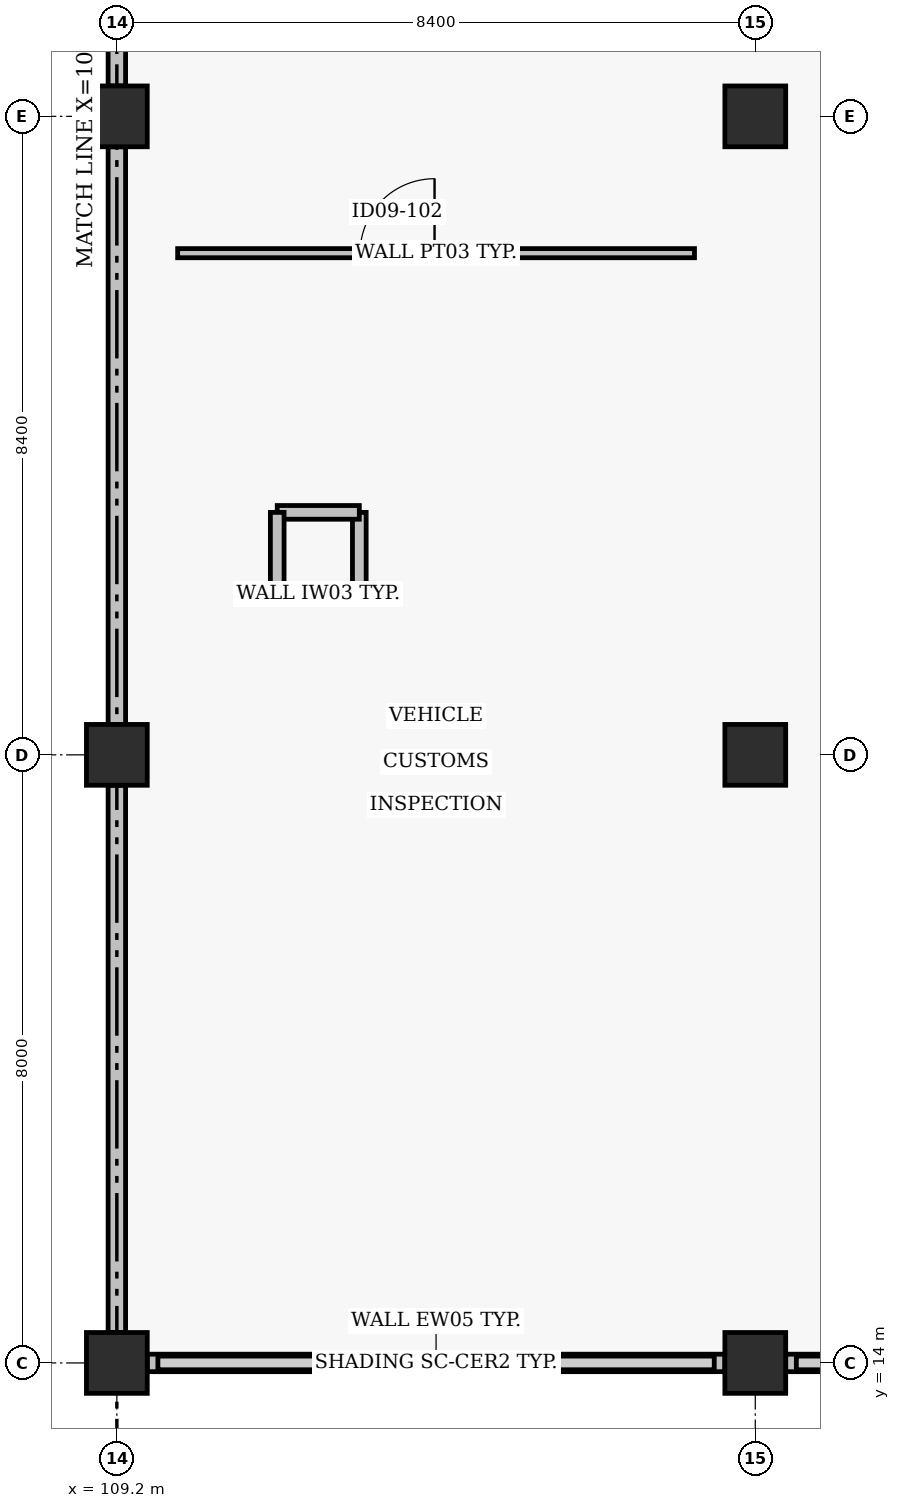
"""IFC4 building model, lengths in metres.
Left out: names, types, materials, properties, quantities, classifications, styles, units other than length and angle.
Written with IfcOpenShell. Run it as: python <this file> out.ifc"""

import sys

from ifc_helpers import new_model, si_unit, direction, frame, frame_2d, origin, origin_2d, place, context, subcontext, project, spatial, rectangle, extrude, element, fill, save


model = new_model("IFC4")
c1 = context("Model", 3, precision=1e-05, world=origin(), true_north=direction((0.0, 1.0)))
c2 = subcontext(c1, "Body", "Model", "MODEL_VIEW")
j1 = project(units=[si_unit("LENGTHUNIT", "METRE"), si_unit("PLANEANGLEUNIT", "RADIAN")], contexts=[c1])
p1 = place(None, origin())
s1 = spatial("IfcSite", under=j1, at=p1, CompositionType="ELEMENT")
p2 = place(p1, origin())
s2 = spatial("IfcBuilding", under=s1, at=p2, CompositionType="ELEMENT")
p3 = place(p2, frame((0.0, 0.0, 5.44)))
s3 = spatial("IfcBuildingStorey", under=s2, at=p3, CompositionType="ELEMENT", Elevation=5.44)
for number, where, z_axis, x_axis in (
    (1, (109.2, 14.0, 0.0), (0.0, 0.0, 1.0), (1.0, 0.0, 0.0)),
    (2, (109.2, 22.0, 0.0), (0.0, 0.0, 1.0), (1.0, 0.0, 0.0)),
    (3, (109.2, 30.4, 0.0), (0.0, 0.0, 1.0), (1.0, 0.0, 0.0)),
    (4, (117.6, 14.0, 0.0), (0.0, 0.0, 1.0), (1.0, 0.0, 0.0)),
    (5, (117.6, 22.0, 0.0), (0.0, 0.0, 1.0), (1.0, 0.0, 0.0)),
    (6, (117.6, 30.4, 0.0), (0.0, 0.0, 1.0), (1.0, 0.0, 0.0)),
):
    element("IfcColumn", number, at=place(p3, frame(where, z_axis=z_axis, x_axis=x_axis)), inside=s3, PredefinedType="COLUMN", context=c2, shape_type="SweptSolid", body=[
        extrude(rectangle(XDim=0.8, YDim=0.8, at=origin_2d()), origin(), (0.0, 0.0, 1.0), 4.16),
    ])
p4 = place(p3, frame((109.6, 14.0, 0.0), z_axis=(0.0, 0.0, 1.0), x_axis=(1.0, 0.0, 0.0)))
e7 = element("IfcWall", 7, at=p4, inside=s3, PredefinedType="PARAPET", context=c2, shape_type="SweptSolid", body=[
    extrude(rectangle(XDim=7.6, YDim=0.23, at=frame_2d((3.8, 0.0))), origin(), (0.0, 0.0, 1.0), 1.15),
])
p5 = place(p3, frame((118.0, 14.0, 0.0), z_axis=(0.0, 0.0, 1.0), x_axis=(1.0, 0.0, 0.0)))
e8 = element("IfcWall", 8, at=p5, inside=s3, PredefinedType="PARAPET", context=c2, shape_type="SweptSolid", body=[
    extrude(rectangle(XDim=7.6, YDim=0.23, at=frame_2d((3.8, 0.0))), origin(), (0.0, 0.0, 1.0), 1.15),
])
p6 = place(p3, frame((109.2, 14.4, 0.0), z_axis=(0.0, 0.0, 1.0), x_axis=(0.0, 1.0, 0.0)))
e9 = element("IfcWall", 9, at=p6, inside=s3, PredefinedType="PARAPET", context=c2, shape_type="SweptSolid", body=[
    extrude(rectangle(XDim=7.2, YDim=0.23, at=frame_2d((3.6, 0.0))), origin(), (0.0, 0.0, 1.0), 1.15),
])
p7 = place(p3, frame((109.2, 22.4, 0.0), z_axis=(0.0, 0.0, 1.0), x_axis=(0.0, 1.0, 0.0)))
e10 = element("IfcWall", 10, at=p7, inside=s3, PredefinedType="PARAPET", context=c2, shape_type="SweptSolid", body=[
    extrude(rectangle(XDim=7.6, YDim=0.23, at=frame_2d((3.8, 0.0))), origin(), (0.0, 0.0, 1.0), 1.15),
])
p8 = place(p3, frame((109.2, 30.8, 0.0), z_axis=(0.0, 0.0, 1.0), x_axis=(0.0, 1.0, 0.0)))
e11 = element("IfcWall", 11, at=p8, inside=s3, PredefinedType="PARAPET", context=c2, shape_type="SweptSolid", body=[
    extrude(rectangle(XDim=7.6, YDim=0.23, at=frame_2d((3.8, 0.0))), origin(), (0.0, 0.0, 1.0), 1.15),
])
for number, where, z_axis, x_axis in (
    (12, (111.31, 24.11, 0.0), (0.0, 0.0, 1.0), (1.0, 0.0, 0.0)),
    (13, (112.39, 24.11, 0.0), (0.0, 0.0, 1.0), (0.0, 1.0, 0.0)),
    (14, (112.39, 25.19, 0.0), (0.0, 0.0, 1.0), (-1.0, 0.0, 0.0)),
    (15, (111.31, 25.19, 0.0), (0.0, 0.0, 1.0), (0.0, -1.0, 0.0)),
):
    element("IfcWall", number, at=place(p3, frame(where, z_axis=z_axis, x_axis=x_axis)), inside=s3, PredefinedType="SOLIDWALL", context=c2, shape_type="SweptSolid", body=[
        extrude(rectangle(XDim=1.08, YDim=0.18, at=frame_2d((0.54, 0.0))), origin(), (0.0, 0.0, 1.0), 2.6),
    ])
p9 = place(p3, frame((110.0, 28.6, 0.0), z_axis=(0.0, 0.0, 1.0), x_axis=(1.0, 0.0, 0.0)))
e16 = element("IfcWall", 16, at=p9, inside=s3, PredefinedType="PARTITIONING", context=c2, shape_type="SweptSolid", body=[
    extrude(rectangle(XDim=6.8, YDim=0.12, at=frame_2d((3.4, 0.0))), origin(), (0.0, 0.0, 1.0), 2.9),
])
p10 = place(p9, frame((2.4, 0.0, 0.0)))
e17 = element("IfcOpeningElement", 17, at=p10, cuts=e16, PredefinedType="OPENING", context=c2, shape_type="SweptSolid", body=[
    extrude(rectangle(XDim=0.98, YDim=2.12, at=frame_2d((0.49, 1.06))), frame((0.0, 0.07, 0.0), z_axis=(0.0, -1.0, 0.0), x_axis=(1.0, 0.0, 0.0)), (0.0, 0.0, 1.0), 0.14),
])
p11 = place(p10, origin())
e18 = element("IfcDoor", 18, at=p11, inside=s3, OperationType="SINGLE_SWING_RIGHT", PredefinedType="DOOR", context=c2, shape_type="SweptSolid", body=[
    extrude(rectangle(XDim=0.98, YDim=2.12, at=frame_2d((0.49, 1.06))), frame((0.0, 0.025, 0.0), z_axis=(0.0, -1.0, 0.0), x_axis=(1.0, 0.0, 0.0)), (0.0, 0.0, 1.0), 0.05),
])
fill(e17, e18)
save(model, sys.argv[1])
